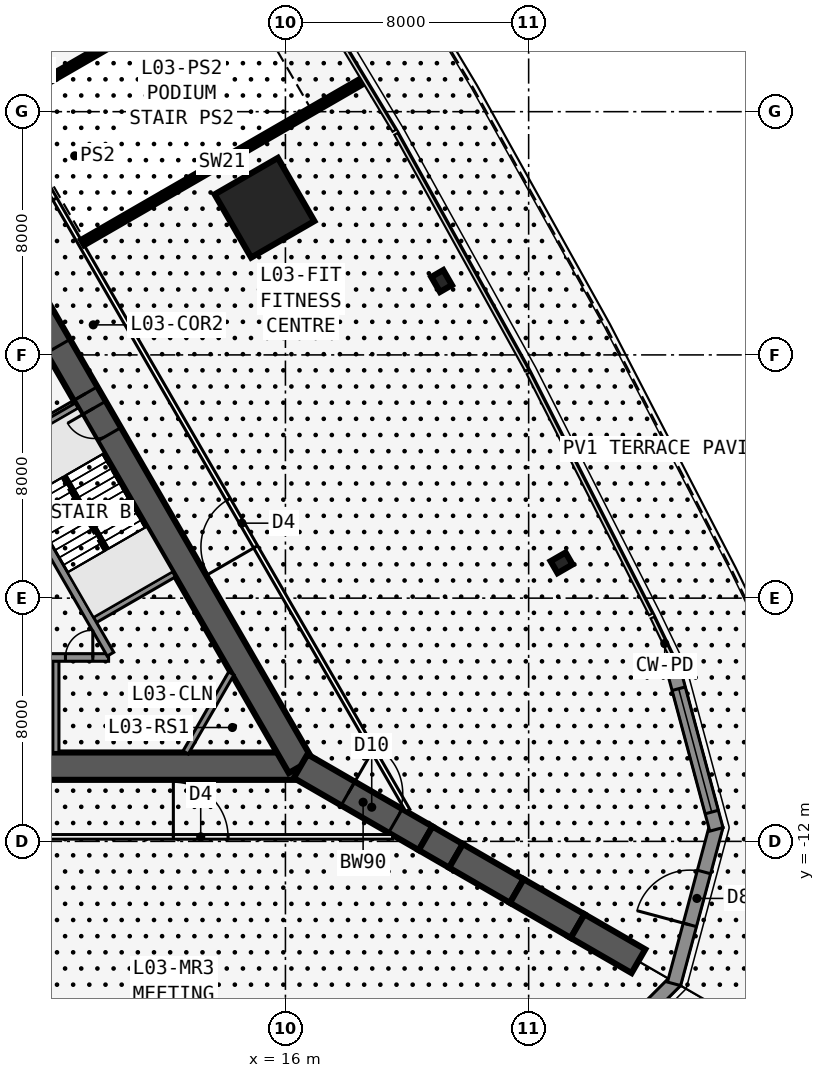
"""IFC4 building model, lengths in metres.
Left out: names, types, materials, properties, quantities, classifications, styles, units other than length and angle.
Written with IfcOpenShell. Run it as: python <this file> out.ifc"""

import sys

from ifc_helpers import new_model, si_unit, direction, frame, frame_2d, origin, origin_2d, place, context, subcontext, project, spatial, rectangle, i_section, extrude, element, fill, save


model = new_model("IFC4")
c1 = context("Model", 3, precision=1e-05, world=origin(), true_north=direction((0.0, 1.0)))
c2 = subcontext(c1, "Body", "Model", "MODEL_VIEW")
j1 = project(units=[si_unit("LENGTHUNIT", "METRE"), si_unit("PLANEANGLEUNIT", "RADIAN")], contexts=[c1])
p1 = place(None, origin())
s1 = spatial("IfcSite", under=j1, at=p1, CompositionType="ELEMENT")
p2 = place(p1, origin())
s2 = spatial("IfcBuilding", under=s1, at=p2, CompositionType="ELEMENT")
p3 = place(p2, frame((0.0, 0.0, 17.5)))
s3 = spatial("IfcBuildingStorey", under=s2, at=p3, CompositionType="ELEMENT", Elevation=17.5)
p4 = place(p3, frame((-16.5, -9.526, 0.0), z_axis=(0.0, 0.0, 1.0), x_axis=(1.0, 0.0, 0.0)))
e1 = element("IfcWall", 1, at=p4, inside=s3, PredefinedType="SHEAR", context=c2, shape_type="SweptSolid", body=[
    extrude(rectangle(XDim=33.0, YDim=0.9, at=frame_2d((16.5, 0.0))), origin(), (0.0, 0.0, 1.0), 5.0),
])
p5 = place(p4, frame((14.05, 0.0, 0.0)))
e2 = element("IfcOpeningElement", 2, at=p5, cuts=e1, PredefinedType="OPENING", context=c2, shape_type="SweptSolid", body=[
    extrude(rectangle(XDim=1.8, YDim=2.13, at=frame_2d((0.9, 1.065))), frame((0.0, 0.46, 0.0), z_axis=(0.0, -1.0, 0.0), x_axis=(1.0, 0.0, 0.0)), (0.0, 0.0, 1.0), 0.92),
])
p6 = place(p3, frame((-0.55, -5.951, 0.0), z_axis=(0.0, 0.0, 1.0), x_axis=(1.0, 0.0, 0.0)))
e3 = element("IfcWall", 3, at=p6, inside=s3, PredefinedType="SOLIDWALL", context=c2, shape_type="SweptSolid", body=[
    extrude(rectangle(XDim=10.733, YDim=0.25, at=frame_2d((5.366, 0.0))), origin(), (0.0, 0.0, 1.0), 4.75),
])
p7 = place(p6, frame((9.314, 0.0, 0.0)))
e4 = element("IfcOpeningElement", 4, at=p7, cuts=e3, PredefinedType="OPENING", context=c2, shape_type="SweptSolid", body=[
    extrude(rectangle(XDim=0.9, YDim=2.13, at=frame_2d((0.45, 1.065))), frame((0.0, 0.135, 0.0), z_axis=(0.0, -1.0, 0.0), x_axis=(1.0, 0.0, 0.0)), (0.0, 0.0, 1.0), 0.27),
])
p8 = place(p6, frame((1.05, 0.0, 0.0)))
e5 = element("IfcOpeningElement", 5, at=p8, cuts=e3, PredefinedType="OPENING", context=c2, shape_type="SweptSolid", body=[
    extrude(rectangle(XDim=1.1, YDim=2.13, at=frame_2d((0.55, 1.065))), frame((0.0, 0.135, 0.0), z_axis=(0.0, -1.0, 0.0), x_axis=(1.0, 0.0, 0.0)), (0.0, 0.0, 1.0), 0.27),
])
p9 = place(p6, frame((4.05, 0.0, 0.0)))
e6 = element("IfcOpeningElement", 6, at=p9, cuts=e3, PredefinedType="OPENING", context=c2, shape_type="SweptSolid", body=[
    extrude(rectangle(XDim=1.1, YDim=2.13, at=frame_2d((0.55, 1.065))), frame((0.0, 0.135, 0.0), z_axis=(0.0, -1.0, 0.0), x_axis=(1.0, 0.0, 0.0)), (0.0, 0.0, 1.0), 0.27),
])
p10 = place(p3, frame((8.45, -5.951, 0.0), z_axis=(0.0, 0.0, 1.0), x_axis=(0.0, -1.0, 0.0)))
e7 = element("IfcWall", 7, at=p10, inside=s3, PredefinedType="SOLIDWALL", context=c2, shape_type="SweptSolid", body=[
    extrude(rectangle(XDim=3.125, YDim=0.2, at=frame_2d((1.562, 0.0))), origin(), (0.0, 0.0, 1.0), 4.75),
])
p11 = place(p3, frame((16.5, -9.526, 0.0), z_axis=(0.0, 0.0, 1.0), x_axis=(-0.499999749417, 0.866025548458, 0.0)))
e8 = element("IfcWall", 8, at=p11, inside=s3, PredefinedType="SHEAR", context=c2, shape_type="SweptSolid", body=[
    extrude(rectangle(XDim=33.0, YDim=0.9, at=frame_2d((16.5, 0.0))), origin(), (0.0, 0.0, 1.0), 5.0),
])
p12 = place(p11, frame((14.15, 0.0, 0.0)))
e9 = element("IfcOpeningElement", 9, at=p12, cuts=e8, PredefinedType="OPENING", context=c2, shape_type="SweptSolid", body=[
    extrude(rectangle(XDim=1.8, YDim=2.13, at=frame_2d((0.9, 1.065))), frame((0.0, 0.46, 0.0), z_axis=(0.0, -1.0, 0.0), x_axis=(1.0, 0.0, 0.0)), (0.0, 0.0, 1.0), 0.92),
])
p13 = place(p11, frame((12.6, 0.0, 0.0)))
e10 = element("IfcOpeningElement", 10, at=p13, cuts=e8, PredefinedType="OPENING", context=c2, shape_type="SweptSolid", body=[
    extrude(rectangle(XDim=1.0, YDim=2.13, at=frame_2d((0.5, 1.065))), frame((0.0, 0.46, 0.0), z_axis=(0.0, -1.0, 0.0), x_axis=(1.0, 0.0, 0.0)), (0.0, 0.0, 1.0), 0.92),
])
p14 = place(p3, frame((10.245, -5.843, 0.0), z_axis=(0.0, 0.0, 1.0), x_axis=(-0.499993009313, 0.866029439822, 0.0)))
e11 = element("IfcWall", 11, at=p14, inside=s3, PredefinedType="SOLIDWALL", context=c2, shape_type="SweptSolid", body=[
    extrude(rectangle(XDim=7.733, YDim=0.25, at=frame_2d((3.866, 0.0))), origin(), (0.0, 0.0, 1.0), 4.75),
])
for number, where, z_axis, x_axis in (
    (12, (9.629, -4.775, 0.0), (0.0, 0.0, 1.0), (0.866, 0.5, 0.0)),
    (13, (6.429, 0.767, 0.0), (0.0, 0.0, 1.0), (0.866, 0.5, 0.0)),
):
    element("IfcWall", number, at=place(p3, frame(where, z_axis=z_axis, x_axis=x_axis)), inside=s3, PredefinedType="SOLIDWALL", context=c2, shape_type="SweptSolid", body=[
        extrude(rectangle(XDim=3.125, YDim=0.2, at=frame_2d((1.562, 0.0))), origin(), (0.0, 0.0, 1.0), 4.75),
    ])
p15 = place(p3, frame((16.5, -9.526, 0.0), z_axis=(0.0, 0.0, 1.0), x_axis=(0.866031398331, -0.499989616998, 0.0)))
e14 = element("IfcWall", 14, at=p15, inside=s3, PredefinedType="SHEAR", context=c2, shape_type="SweptSolid", body=[
    extrude(rectangle(XDim=4.746, YDim=0.9, at=frame_2d((2.373, 0.0))), origin(), (0.0, 0.0, 1.0), 5.0),
])
p16 = place(p15, frame((1.8, 0.0, 0.0)))
e15 = element("IfcOpeningElement", 15, at=p16, cuts=e14, PredefinedType="OPENING", context=c2, shape_type="SweptSolid", body=[
    extrude(rectangle(XDim=1.8, YDim=2.13, at=frame_2d((0.9, 1.065))), frame((0.0, 0.46, 0.0), z_axis=(0.0, -1.0, 0.0), x_axis=(1.0, 0.0, 0.0)), (0.0, 0.0, 1.0), 0.92),
])
p17 = place(p3, frame((20.61, -11.899, 0.0), z_axis=(0.0, 0.0, 1.0), x_axis=(0.866009537788, -0.500027479704, 0.0)))
e16 = element("IfcWall", 16, at=p17, inside=s3, PredefinedType="SHEAR", context=c2, shape_type="SweptSolid", body=[
    extrude(rectangle(XDim=1.155, YDim=0.9, at=frame_2d((0.577, 0.0))), origin(), (0.0, 0.0, 1.0), 5.0),
])
for number, where, z_axis, x_axis in (
    (17, (21.61, -12.477, 0.0), (0.0, 0.0, 1.0), (0.866, -0.5, 0.0)),
    (18, (23.61, -13.631, 0.0), (0.0, 0.0, 1.0), (0.866, -0.5, 0.0)),
    (19, (25.61, -14.786, 0.0), (0.0, 0.0, 1.0), (0.866, -0.5, 0.0)),
):
    element("IfcWall", number, at=place(p3, frame(where, z_axis=z_axis, x_axis=x_axis)), inside=s3, PredefinedType="SHEAR", context=c2, shape_type="SweptSolid", body=[
        extrude(rectangle(XDim=2.309, YDim=0.9, at=frame_2d((1.155, 0.0))), origin(), (0.0, 0.0, 1.0), 5.0),
    ])
for number, where, z_axis, x_axis in (
    (20, (25.083, -2.839, 0.0), (0.0, 0.0, 1.0), (-0.5, 0.866, 0.0)),
    (21, (21.137, 6.43, 0.0), (0.0, 0.0, 1.0), (0.866, 0.5, 0.0)),
):
    element("IfcColumn", number, at=place(p3, frame(where, z_axis=z_axis, x_axis=x_axis)), inside=s3, PredefinedType="COLUMN", context=c2, shape_type="SweptSolid", body=[
        extrude(i_section(OverallWidth=0.455, OverallDepth=0.569, WebThickness=0.078, FlangeThickness=0.125, at=origin_2d()), origin(), (0.0, 0.0, 1.0), 5.0),
    ])
p18 = place(p3, frame((15.312, 8.84, 0.0), z_axis=(0.0, 0.0, 1.0), x_axis=(0.866025403784, 0.5, 0.0)))
e22 = element("IfcColumn", 22, at=p18, inside=s3, PredefinedType="COLUMN", context=c2, shape_type="SweptSolid", body=[
    extrude(rectangle(XDim=2.4, YDim=2.4, at=origin_2d()), origin(), (0.0, 0.0, 1.0), 5.0),
])
p19 = place(p3, frame((25.037, -20.388, 0.0), z_axis=(0.0, 0.0, 1.0), x_axis=(0.707084088779, 0.707129472866, 0.0)))
e23 = element("IfcWall", 23, at=p19, inside=s3, PredefinedType="SOLIDWALL", context=c2, shape_type="SweptSolid", body=[
    extrude(rectangle(XDim=5.379, YDim=0.45, at=frame_2d((2.69, 0.0))), origin(), (0.0, 0.0, 1.0), 4.75),
])
p20 = place(p19, frame((0.671, 0.0, 0.6)))
e24 = element("IfcOpeningElement", 24, at=p20, cuts=e23, PredefinedType="OPENING", context=c2, shape_type="SweptSolid", body=[
    extrude(rectangle(XDim=3.6, YDim=3.2, at=frame_2d((1.8, 1.6))), frame((0.0, 0.235, 0.0), z_axis=(0.0, -1.0, 0.0), x_axis=(1.0, 0.0, 0.0)), (0.0, 0.0, 1.0), 0.47),
])
p21 = place(p3, frame((28.783, -16.685, 0.0), z_axis=(0.0, 0.0, 1.0), x_axis=(0.258817748921, 0.965926173599, 0.0)))
e25 = element("IfcWall", 25, at=p21, inside=s3, PredefinedType="SOLIDWALL", context=c2, shape_type="SweptSolid", body=[
    extrude(rectangle(XDim=5.38, YDim=0.45, at=frame_2d((2.69, 0.0))), origin(), (0.0, 0.0, 1.0), 4.75),
])
p22 = place(p21, frame((2.008, 0.0, 0.0)))
e26 = element("IfcOpeningElement", 26, at=p22, cuts=e25, PredefinedType="OPENING", context=c2, shape_type="SweptSolid", body=[
    extrude(rectangle(XDim=1.8, YDim=2.4, at=frame_2d((0.9, 1.2))), frame((0.0, 0.235, 0.0), z_axis=(0.0, -1.0, 0.0), x_axis=(1.0, 0.0, 0.0)), (0.0, 0.0, 1.0), 0.47),
])
p23 = place(p3, frame((30.175, -11.605, 0.0), z_axis=(0.0, 0.0, 1.0), x_axis=(-0.258829095032, 0.965923133363, 0.0)))
e27 = element("IfcWall", 27, at=p23, inside=s3, PredefinedType="SOLIDWALL", context=c2, shape_type="SweptSolid", body=[
    extrude(rectangle(XDim=5.379, YDim=0.45, at=frame_2d((2.69, 0.0))), origin(), (0.0, 0.0, 1.0), 4.75),
])
p24 = place(p23, frame((0.59, 0.0, 0.6)))
e28 = element("IfcOpeningElement", 28, at=p24, cuts=e27, PredefinedType="OPENING", context=c2, shape_type="SweptSolid", body=[
    extrude(rectangle(XDim=4.2, YDim=3.2, at=frame_2d((2.1, 1.6))), frame((0.0, 0.235, 0.0), z_axis=(0.0, -1.0, 0.0), x_axis=(1.0, 0.0, 0.0)), (0.0, 0.0, 1.0), 0.47),
])
p25 = place(p3, frame((-19.527, -11.851, 0.0), z_axis=(0.0, 0.0, 1.0), x_axis=(1.0, 0.0, 0.0)))
e29 = element("IfcWall", 29, at=p25, inside=s3, PredefinedType="PARTITIONING", context=c2, shape_type="SweptSolid", body=[
    extrude(rectangle(XDim=39.054, YDim=0.15, at=frame_2d((19.527, 0.0))), origin(), (0.0, 0.0, 1.0), 4.75),
])
p26 = place(p25, frame((6.013, 0.0, 0.0)))
e30 = element("IfcOpeningElement", 30, at=p26, cuts=e29, PredefinedType="OPENING", context=c2, shape_type="SweptSolid", body=[
    extrude(rectangle(XDim=1.8, YDim=2.13, at=frame_2d((0.9, 1.065))), frame((0.0, 0.085, 0.0), z_axis=(0.0, -1.0, 0.0), x_axis=(1.0, 0.0, 0.0)), (0.0, 0.0, 1.0), 0.17),
])
p27 = place(p25, frame((16.627, 0.0, 0.0)))
e31 = element("IfcOpeningElement", 31, at=p27, cuts=e29, PredefinedType="OPENING", context=c2, shape_type="SweptSolid", body=[
    extrude(rectangle(XDim=1.8, YDim=2.13, at=frame_2d((0.9, 1.065))), frame((0.0, 0.085, 0.0), z_axis=(0.0, -1.0, 0.0), x_axis=(1.0, 0.0, 0.0)), (0.0, 0.0, 1.0), 0.17),
])
p28 = place(p25, frame((23.227, 0.0, 0.0)))
e32 = element("IfcOpeningElement", 32, at=p28, cuts=e29, PredefinedType="OPENING", context=c2, shape_type="SweptSolid", body=[
    extrude(rectangle(XDim=1.8, YDim=2.13, at=frame_2d((0.9, 1.065))), frame((0.0, 0.085, 0.0), z_axis=(0.0, -1.0, 0.0), x_axis=(1.0, 0.0, 0.0)), (0.0, 0.0, 1.0), 0.17),
])
p29 = place(p25, frame((31.841, 0.0, 0.0)))
e33 = element("IfcOpeningElement", 33, at=p29, cuts=e29, PredefinedType="OPENING", context=c2, shape_type="SweptSolid", body=[
    extrude(rectangle(XDim=1.8, YDim=2.13, at=frame_2d((0.9, 1.065))), frame((0.0, 0.085, 0.0), z_axis=(0.0, -1.0, 0.0), x_axis=(1.0, 0.0, 0.0)), (0.0, 0.0, 1.0), 0.17),
])
p30 = place(p3, frame((20.027, -10.985, 0.0), z_axis=(0.0, 0.0, 1.0), x_axis=(-0.500001677587, 0.866024435227, 0.0)))
e34 = element("IfcWall", 34, at=p30, inside=s3, PredefinedType="PARTITIONING", context=c2, shape_type="SweptSolid", body=[
    extrude(rectangle(XDim=39.054, YDim=0.15, at=frame_2d((19.527, 0.0))), origin(), (0.0, 0.0, 1.0), 4.75),
])
p31 = place(p30, frame((10.013, 0.0, 0.0)))
e35 = element("IfcOpeningElement", 35, at=p31, cuts=e34, PredefinedType="OPENING", context=c2, shape_type="SweptSolid", body=[
    extrude(rectangle(XDim=1.8, YDim=2.13, at=frame_2d((0.9, 1.065))), frame((0.0, 0.085, 0.0), z_axis=(0.0, -1.0, 0.0), x_axis=(1.0, 0.0, 0.0)), (0.0, 0.0, 1.0), 0.17),
])
p32 = place(p30, frame((23.227, 0.0, 0.0)))
e36 = element("IfcOpeningElement", 36, at=p32, cuts=e34, PredefinedType="OPENING", context=c2, shape_type="SweptSolid", body=[
    extrude(rectangle(XDim=1.8, YDim=2.13, at=frame_2d((0.9, 1.065))), frame((0.0, 0.085, 0.0), z_axis=(0.0, -1.0, 0.0), x_axis=(1.0, 0.0, 0.0)), (0.0, 0.0, 1.0), 0.17),
])
p33 = place(p30, frame((27.627, 0.0, 0.0)))
e37 = element("IfcOpeningElement", 37, at=p33, cuts=e34, PredefinedType="OPENING", context=c2, shape_type="SweptSolid", body=[
    extrude(rectangle(XDim=1.0, YDim=2.13, at=frame_2d((0.5, 1.065))), frame((0.0, 0.085, 0.0), z_axis=(0.0, -1.0, 0.0), x_axis=(1.0, 0.0, 0.0)), (0.0, 0.0, 1.0), 0.17),
])
p34 = place(p30, frame((30.527, 0.0, 0.0)))
e38 = element("IfcOpeningElement", 38, at=p34, cuts=e34, PredefinedType="OPENING", context=c2, shape_type="SweptSolid", body=[
    extrude(rectangle(XDim=1.0, YDim=2.13, at=frame_2d((0.5, 1.065))), frame((0.0, 0.085, 0.0), z_axis=(0.0, -1.0, 0.0), x_axis=(1.0, 0.0, 0.0)), (0.0, 0.0, 1.0), 0.17),
])
p35 = place(p30, frame((33.277, 0.0, 0.0)))
e39 = element("IfcOpeningElement", 39, at=p35, cuts=e34, PredefinedType="OPENING", context=c2, shape_type="SweptSolid", body=[
    extrude(rectangle(XDim=1.0, YDim=2.13, at=frame_2d((0.5, 1.065))), frame((0.0, 0.085, 0.0), z_axis=(0.0, -1.0, 0.0), x_axis=(1.0, 0.0, 0.0)), (0.0, 0.0, 1.0), 0.17),
])
p36 = place(p30, frame((36.39, 0.0, 0.0)))
e40 = element("IfcOpeningElement", 40, at=p36, cuts=e34, PredefinedType="OPENING", context=c2, shape_type="SweptSolid", body=[
    extrude(rectangle(XDim=1.0, YDim=2.13, at=frame_2d((0.5, 1.065))), frame((0.0, 0.085, 0.0), z_axis=(0.0, -1.0, 0.0), x_axis=(1.0, 0.0, 0.0)), (0.0, 0.0, 1.0), 0.17),
])
p37 = place(p3, frame((9.329, 7.695, 0.0), z_axis=(0.0, 0.0, 1.0), x_axis=(0.866032486376, 0.49998773239, 0.0)))
e41 = element("IfcWall", 41, at=p37, inside=s3, PredefinedType="SHEAR", context=c2, shape_type="SweptSolid", body=[
    extrude(rectangle(XDim=10.595, YDim=0.2, at=frame_2d((5.298, 0.0))), origin(), (0.0, 0.0, 1.0), 5.0),
])
p38 = place(p3, frame((6.729, 12.198, 0.0), z_axis=(0.0, 0.0, 1.0), x_axis=(0.866025701527, 0.499999484295, 0.0)))
e42 = element("IfcWall", 42, at=p38, inside=s3, PredefinedType="SHEAR", context=c2, shape_type="SweptSolid", body=[
    extrude(rectangle(XDim=10.502, YDim=0.2, at=frame_2d((5.251, 0.0))), origin(), (0.0, 0.0, 1.0), 5.0),
])
p39 = place(p3, frame((14.219, -6.476, 0.0), z_axis=(0.0, 0.0, 1.0), x_axis=(-0.499952404951, -0.866052881055, 0.0)))
e43 = element("IfcWall", 43, at=p39, inside=s3, PredefinedType="SOLIDWALL", context=c2, shape_type="SweptSolid", body=[
    extrude(rectangle(XDim=3.002, YDim=0.2, at=frame_2d((1.501, 0.0))), origin(), (0.0, 0.0, 1.0), 4.75),
])
p40 = place(p3, frame((10.135, -2.401, 0.0), z_axis=(0.0, 0.0, 1.0), x_axis=(-0.499992232847, 0.866029888106, 0.0)))
e44 = element("IfcWall", 44, at=p40, inside=s3, PredefinedType="SOLIDWALL", context=c2, shape_type="SweptSolid", body=[
    extrude(rectangle(XDim=2.794, YDim=0.1, at=frame_2d((1.397, 0.0))), origin(), (0.0, 0.0, 1.0), 5.0),
])
p41 = place(p22, origin())
e45 = element("IfcDoor", 45, at=p41, inside=s3, OperationType="DOUBLE_DOOR_SINGLE_SWING", PredefinedType="DOOR", context=c2, shape_type="SweptSolid", body=[
    extrude(rectangle(XDim=1.8, YDim=2.4, at=frame_2d((0.9, 1.2))), frame((0.0, 0.025, 0.0), z_axis=(0.0, -1.0, 0.0), x_axis=(1.0, 0.0, 0.0)), (0.0, 0.0, 1.0), 0.05),
])
fill(e26, e45)
p42 = place(p24, origin())
e46 = element("IfcWindow", 46, at=p42, inside=s3, PartitioningType="SINGLE_PANEL", PredefinedType="WINDOW", context=c2, shape_type="SweptSolid", body=[
    extrude(rectangle(XDim=4.2, YDim=3.2, at=frame_2d((2.1, 1.6))), frame((0.0, 0.03, 0.0), z_axis=(0.0, -1.0, 0.0), x_axis=(1.0, 0.0, 0.0)), (0.0, 0.0, 1.0), 0.06),
])
fill(e28, e46)
p43 = place(p29, origin())
e47 = element("IfcDoor", 47, at=p43, inside=s3, OperationType="DOUBLE_DOOR_SINGLE_SWING", PredefinedType="DOOR", context=c2, shape_type="SweptSolid", body=[
    extrude(rectangle(XDim=1.8, YDim=2.13, at=frame_2d((0.9, 1.065))), frame((0.0, 0.025, 0.0), z_axis=(0.0, -1.0, 0.0), x_axis=(1.0, 0.0, 0.0)), (0.0, 0.0, 1.0), 0.05),
])
fill(e33, e47)
p44 = place(p31, origin())
e48 = element("IfcDoor", 48, at=p44, inside=s3, OperationType="DOUBLE_DOOR_SINGLE_SWING", PredefinedType="DOOR", context=c2, shape_type="SweptSolid", body=[
    extrude(rectangle(XDim=1.8, YDim=2.13, at=frame_2d((0.9, 1.065))), frame((0.0, 0.025, 0.0), z_axis=(0.0, -1.0, 0.0), x_axis=(1.0, 0.0, 0.0)), (0.0, 0.0, 1.0), 0.05),
])
fill(e35, e48)
p45 = place(p32, origin())
e49 = element("IfcDoor", 49, at=p45, inside=s3, OperationType="DOUBLE_DOOR_SINGLE_SWING", PredefinedType="DOOR", context=c2, shape_type="SweptSolid", body=[
    extrude(rectangle(XDim=1.8, YDim=2.13, at=frame_2d((0.9, 1.065))), frame((0.0, 0.025, 0.0), z_axis=(0.0, -1.0, 0.0), x_axis=(1.0, 0.0, 0.0)), (0.0, 0.0, 1.0), 0.05),
])
fill(e36, e49)
p46 = place(p12, origin())
e50 = element("IfcDoor", 50, at=p46, inside=s3, OperationType="DOUBLE_DOOR_SINGLE_SWING", PredefinedType="DOOR", context=c2, shape_type="SweptSolid", body=[
    extrude(rectangle(XDim=1.8, YDim=2.13, at=frame_2d((0.9, 1.065))), frame((0.0, 0.025, 0.0), z_axis=(0.0, -1.0, 0.0), x_axis=(1.0, 0.0, 0.0)), (0.0, 0.0, 1.0), 0.05),
])
fill(e9, e50)
p47 = place(p13, origin())
e51 = element("IfcDoor", 51, at=p47, inside=s3, OperationType="SINGLE_SWING_RIGHT", PredefinedType="DOOR", context=c2, shape_type="SweptSolid", body=[
    extrude(rectangle(XDim=1.0, YDim=2.13, at=frame_2d((0.5, 1.065))), frame((0.0, 0.025, 0.0), z_axis=(0.0, -1.0, 0.0), x_axis=(1.0, 0.0, 0.0)), (0.0, 0.0, 1.0), 0.05),
])
fill(e10, e51)
p48 = place(p16, origin())
e52 = element("IfcDoor", 52, at=p48, inside=s3, OperationType="DOUBLE_DOOR_DOUBLE_SWING", PredefinedType="DOOR", context=c2, shape_type="SweptSolid", body=[
    extrude(rectangle(XDim=1.8, YDim=2.13, at=frame_2d((0.9, 1.065))), frame((0.0, 0.025, 0.0), z_axis=(0.0, -1.0, 0.0), x_axis=(1.0, 0.0, 0.0)), (0.0, 0.0, 1.0), 0.05),
])
fill(e15, e52)
p49 = place(p7, origin())
e53 = element("IfcDoor", 53, at=p49, inside=s3, OperationType="SINGLE_SWING_RIGHT", PredefinedType="DOOR", context=c2, shape_type="SweptSolid", body=[
    extrude(rectangle(XDim=0.9, YDim=2.13, at=frame_2d((0.45, 1.065))), frame((0.0, 0.025, 0.0), z_axis=(0.0, -1.0, 0.0), x_axis=(1.0, 0.0, 0.0)), (0.0, 0.0, 1.0), 0.05),
])
fill(e4, e53)
save(model, sys.argv[1])
